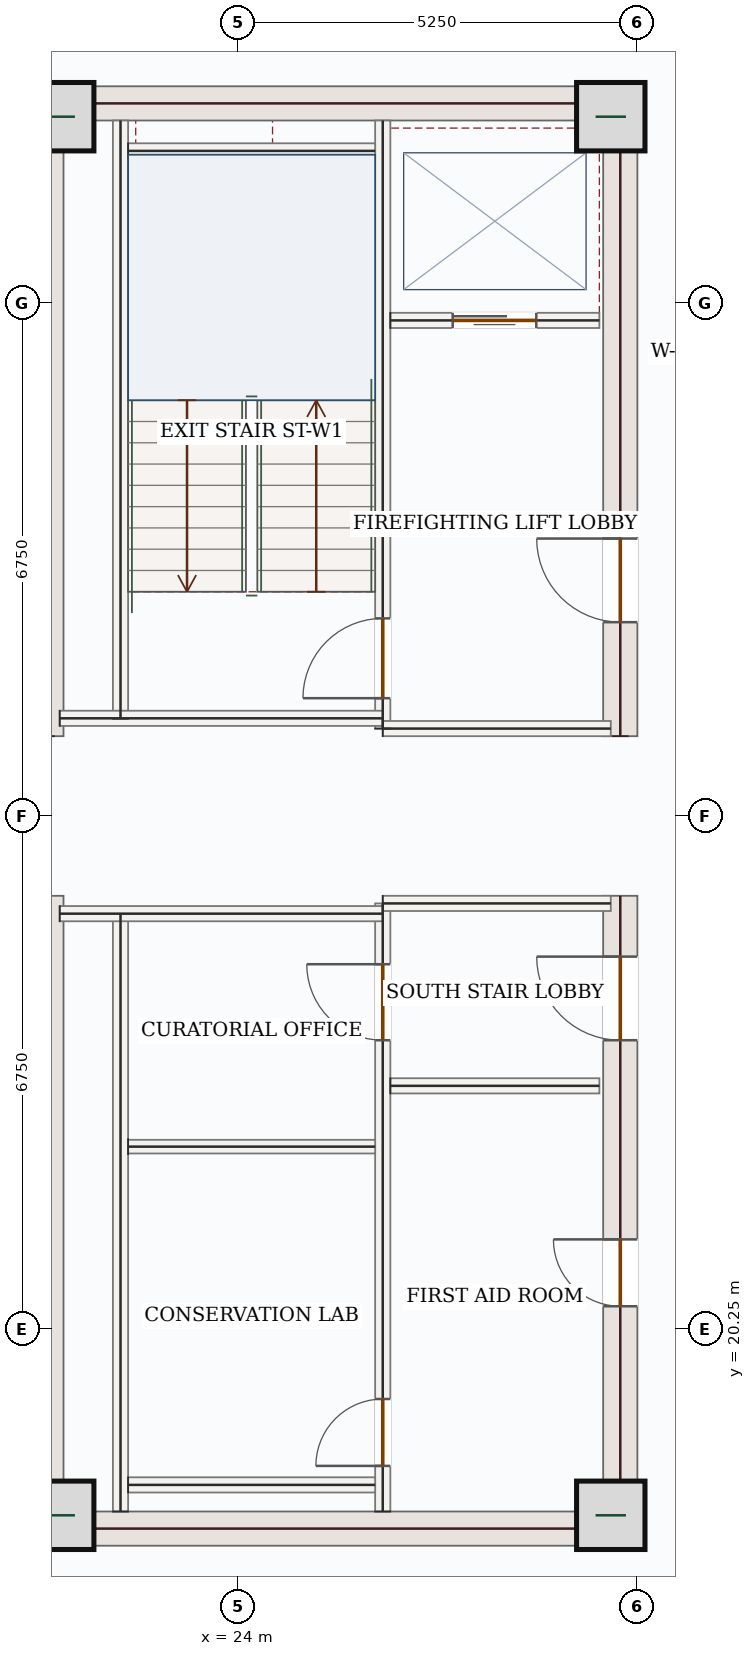
"""IFC4 building model, lengths in metres.
Left out: names, types, materials, properties, quantities, classifications, styles, units other than length and angle.
Written with IfcOpenShell. Run it as: python <this file> out.ifc"""

import sys

from ifc_helpers import new_model, si_unit, direction, frame, frame_2d, origin, origin_2d, place, context, subcontext, project, spatial, rectangle, extrude, source, transform, mapped, element, fill, save


model = new_model("IFC4")
c1 = context("Model", 3, precision=1e-05, world=origin(), true_north=direction((0.0, 1.0)))
c2 = subcontext(c1, "Body", "Model", "MODEL_VIEW")
j1 = project(units=[si_unit("LENGTHUNIT", "METRE"), si_unit("PLANEANGLEUNIT", "RADIAN")], contexts=[c1])
p1 = place(None, origin())
s1 = spatial("IfcSite", under=j1, at=p1, CompositionType="ELEMENT")
p2 = place(p1, origin())
s2 = spatial("IfcBuilding", under=s1, at=p2, CompositionType="ELEMENT")
p3 = place(p2, frame((0.0, 0.0, 353.55)))
s3 = spatial("IfcBuildingStorey", under=s2, at=p3, CompositionType="ELEMENT", Elevation=353.55)
m1 = source(origin(), c2, "Body", "SweptSolid", [
    extrude(rectangle(XDim=8.55, YDim=0.45, at=frame_2d((4.275, 0.0))), origin(), (0.0, 0.0, 1.0), 3.5),
])
for number, where, z_axis, x_axis in (
    (1, (21.475, 17.4, 0.0), (0.0, 0.0, 1.0), (0.0, 1.0, 0.0)),
    (2, (21.475, 28.05, 0.0), (0.0, 0.0, 1.0), (0.0, 1.0, 0.0)),
):
    element("IfcWall", number, at=place(p3, frame(where, z_axis=z_axis, x_axis=x_axis)), inside=s3, PredefinedType="SHEAR", context=c2, shape_type="MappedRepresentation", body=[
        mapped(m1, transform((0.0, 0.0, 0.0), x_axis=(1.0, 0.0, 0.0), y_axis=(0.0, 1.0, 0.0), z_axis=(0.0, 0.0, 1.0), scale=1.0)),
    ])
p4 = place(p3, frame((29.025, 17.4, 0.0), z_axis=(0.0, 0.0, 1.0), x_axis=(0.0, 1.0, 0.0)))
e3 = element("IfcWall", 3, at=p4, inside=s3, PredefinedType="SHEAR", context=c2, shape_type="SweptSolid", body=[
    extrude(rectangle(XDim=8.55, YDim=0.45, at=frame_2d((4.275, 0.0))), origin(), (0.0, 0.0, 1.0), 3.5),
])
p5 = place(p4, frame((6.65, 0.0, 0.0)))
e4 = element("IfcOpeningElement", 4, at=p5, cuts=e3, PredefinedType="OPENING", context=c2, shape_type="SweptSolid", body=[
    extrude(rectangle(XDim=1.1, YDim=2.2, at=frame_2d((0.55, 1.1))), frame((0.0, 0.235, 0.0), z_axis=(0.0, -1.0, 0.0), x_axis=(1.0, 0.0, 0.0)), (0.0, 0.0, 1.0), 0.47),
])
p6 = place(p4, frame((3.15, 0.0, 0.0)))
e5 = element("IfcOpeningElement", 5, at=p6, cuts=e3, PredefinedType="OPENING", context=c2, shape_type="SweptSolid", body=[
    extrude(rectangle(XDim=0.88, YDim=2.1, at=frame_2d((0.44, 1.05))), frame((0.0, 0.235, 0.0), z_axis=(0.0, -1.0, 0.0), x_axis=(1.0, 0.0, 0.0)), (0.0, 0.0, 1.0), 0.47),
])
p7 = place(p3, frame((29.025, 28.05, 0.0), z_axis=(0.0, 0.0, 1.0), x_axis=(0.0, 1.0, 0.0)))
e6 = element("IfcWall", 6, at=p7, inside=s3, PredefinedType="SHEAR", context=c2, shape_type="SweptSolid", body=[
    extrude(rectangle(XDim=8.55, YDim=0.45, at=frame_2d((4.275, 0.0))), origin(), (0.0, 0.0, 1.0), 3.5),
])
p8 = place(p7, frame((1.5, 0.0, 0.0)))
e7 = element("IfcOpeningElement", 7, at=p8, cuts=e6, PredefinedType="OPENING", context=c2, shape_type="SweptSolid", body=[
    extrude(rectangle(XDim=1.1, YDim=2.2, at=frame_2d((0.55, 1.1))), frame((0.0, 0.235, 0.0), z_axis=(0.0, -1.0, 0.0), x_axis=(1.0, 0.0, 0.0)), (0.0, 0.0, 1.0), 0.47),
])
m2 = source(origin(), c2, "Body", "SweptSolid", [
    extrude(rectangle(XDim=7.1, YDim=0.45, at=frame_2d((3.55, 0.0))), origin(), (0.0, 0.0, 1.0), 3.5),
])
for number, where, z_axis, x_axis in (
    (8, (21.7, 17.625, 0.0), (0.0, 0.0, 1.0), (1.0, 0.0, 0.0)),
    (9, (21.7, 36.375, 0.0), (0.0, 0.0, 1.0), (1.0, 0.0, 0.0)),
):
    element("IfcWall", number, at=place(p3, frame(where, z_axis=z_axis, x_axis=x_axis)), inside=s3, PredefinedType="SHEAR", context=c2, shape_type="MappedRepresentation", body=[
        mapped(m2, transform((0.0, 0.0, 0.0), x_axis=(1.0, 0.0, 0.0), y_axis=(0.0, 1.0, 0.0), z_axis=(0.0, 0.0, 1.0), scale=1.0)),
    ])
m3 = source(origin(), c2, "Body", "SweptSolid", [
    extrude(rectangle(XDim=0.9, YDim=0.9, at=origin_2d()), origin(), (0.0, 0.0, 1.0), 3.75),
])
for number, where, z_axis, x_axis in (
    (10, (21.65, 17.8, 0.0), (0.0, 0.0, 1.0), (1.0, 0.0, 0.0)),
    (11, (28.9, 17.8, 0.0), (0.0, 0.0, 1.0), (1.0, 0.0, 0.0)),
    (12, (21.65, 36.2, 0.0), (0.0, 0.0, 1.0), (1.0, 0.0, 0.0)),
    (13, (28.9, 36.2, 0.0), (0.0, 0.0, 1.0), (1.0, 0.0, 0.0)),
):
    element("IfcColumn", number, at=place(p3, frame(where, z_axis=z_axis, x_axis=x_axis)), inside=s3, PredefinedType="COLUMN", context=c2, shape_type="MappedRepresentation", body=[
        mapped(m3, transform((0.0, 0.0, 0.0), x_axis=(1.0, 0.0, 0.0), y_axis=(0.0, 1.0, 0.0), z_axis=(0.0, 0.0, 1.0), scale=1.0)),
    ])
p9 = place(p3, frame((23.005, 14.093, 0.0), z_axis=(0.0, 0.0, 1.0), x_axis=(-0.681486568047, 0.731830620821, 0.0)))
e14 = element("IfcWall", 14, at=p9, inside=s3, PredefinedType="SOLIDWALL", context=c2, shape_type="SweptSolid", body=[
    extrude(rectangle(XDim=5.965, YDim=0.28, at=frame_2d((2.982, 0.0))), origin(), (0.0, 0.0, 1.0), 3.5),
])
p10 = place(p9, frame((2.232, 0.0, 0.85)))
e15 = element("IfcOpeningElement", 15, at=p10, cuts=e14, PredefinedType="OPENING", context=c2, shape_type="SweptSolid", body=[
    extrude(rectangle(XDim=1.5, YDim=1.5, at=frame_2d((0.75, 0.75))), frame((0.0, 0.15, 0.0), z_axis=(0.0, -1.0, 0.0), x_axis=(1.0, 0.0, 0.0)), (0.0, 0.0, 1.0), 0.3),
])
m4 = source(origin(), c2, "Body", "SweptSolid", [
    extrude(rectangle(XDim=7.87, YDim=0.2, at=frame_2d((3.935, 0.0))), origin(), (0.0, 0.0, 1.0), 3.5),
])
for number, where, z_axis, x_axis in (
    (16, (22.45, 17.85, 0.0), (0.0, 0.0, 1.0), (0.0, 1.0, 0.0)),
    (17, (22.45, 28.28, 0.0), (0.0, 0.0, 1.0), (0.0, 1.0, 0.0)),
):
    element("IfcWall", number, at=place(p3, frame(where, z_axis=z_axis, x_axis=x_axis)), inside=s3, PredefinedType="SOLIDWALL", context=c2, shape_type="MappedRepresentation", body=[
        mapped(m4, transform((0.0, 0.0, 0.0), x_axis=(1.0, 0.0, 0.0), y_axis=(0.0, 1.0, 0.0), z_axis=(0.0, 0.0, 1.0), scale=1.0)),
    ])
p11 = place(p3, frame((25.9, 17.85, 0.0), z_axis=(0.0, 0.0, 1.0), x_axis=(0.0, 1.0, 0.0)))
e18 = element("IfcWall", 18, at=p11, inside=s3, PredefinedType="SOLIDWALL", context=c2, shape_type="SweptSolid", body=[
    extrude(rectangle(XDim=8.0, YDim=0.2, at=frame_2d((4.0, 0.0))), origin(), (0.0, 0.0, 1.0), 3.5),
])
p12 = place(p11, frame((6.2, 0.0, 0.0)))
e19 = element("IfcOpeningElement", 19, at=p12, cuts=e18, PredefinedType="OPENING", context=c2, shape_type="SweptSolid", body=[
    extrude(rectangle(XDim=1.0, YDim=2.15, at=frame_2d((0.5, 1.075))), frame((0.0, 0.11, 0.0), z_axis=(0.0, -1.0, 0.0), x_axis=(1.0, 0.0, 0.0)), (0.0, 0.0, 1.0), 0.22),
])
p13 = place(p11, frame((0.6, 0.0, 0.0)))
e20 = element("IfcOpeningElement", 20, at=p13, cuts=e18, PredefinedType="OPENING", context=c2, shape_type="SweptSolid", body=[
    extrude(rectangle(XDim=0.88, YDim=2.1, at=frame_2d((0.44, 1.05))), frame((0.0, 0.11, 0.0), z_axis=(0.0, -1.0, 0.0), x_axis=(1.0, 0.0, 0.0)), (0.0, 0.0, 1.0), 0.22),
])
p14 = place(p3, frame((25.9, 28.15, 0.0), z_axis=(0.0, 0.0, 1.0), x_axis=(0.0, 1.0, 0.0)))
e21 = element("IfcWall", 21, at=p14, inside=s3, PredefinedType="SOLIDWALL", context=c2, shape_type="SweptSolid", body=[
    extrude(rectangle(XDim=8.0, YDim=0.2, at=frame_2d((4.0, 0.0))), origin(), (0.0, 0.0, 1.0), 3.5),
])
p15 = place(p14, frame((0.4, 0.0, 0.0)))
e22 = element("IfcOpeningElement", 22, at=p15, cuts=e21, PredefinedType="OPENING", context=c2, shape_type="SweptSolid", body=[
    extrude(rectangle(XDim=1.05, YDim=2.15, at=frame_2d((0.525, 1.075))), frame((0.0, 0.11, 0.0), z_axis=(0.0, -1.0, 0.0), x_axis=(1.0, 0.0, 0.0)), (0.0, 0.0, 1.0), 0.22),
])
m5 = source(origin(), c2, "Body", "SweptSolid", [
    extrude(rectangle(XDim=4.25, YDim=0.2, at=frame_2d((2.125, 0.0))), origin(), (0.0, 0.0, 1.0), 3.5),
])
p16 = place(p3, frame((21.65, 25.715, 0.0), z_axis=(0.0, 0.0, 1.0), x_axis=(1.0, 0.0, 0.0)))
e23 = element("IfcWall", 23, at=p16, inside=s3, PredefinedType="SOLIDWALL", context=c2, shape_type="MappedRepresentation", body=[
    mapped(m5, transform((0.0, 0.0, 0.0), x_axis=(1.0, 0.0, 0.0), y_axis=(0.0, 1.0, 0.0), z_axis=(0.0, 0.0, 1.0), scale=1.0)),
])
m6 = source(origin(), c2, "Body", "SweptSolid", [
    extrude(rectangle(XDim=3.0, YDim=0.2, at=frame_2d((1.5, 0.0))), origin(), (0.0, 0.0, 1.0), 3.5),
])
p17 = place(p3, frame((25.9, 25.85, 0.0), z_axis=(0.0, 0.0, 1.0), x_axis=(1.0, 0.0, 0.0)))
e24 = element("IfcWall", 24, at=p17, inside=s3, PredefinedType="SOLIDWALL", context=c2, shape_type="MappedRepresentation", body=[
    mapped(m6, transform((0.0, 0.0, 0.0), x_axis=(1.0, 0.0, 0.0), y_axis=(0.0, 1.0, 0.0), z_axis=(0.0, 0.0, 1.0), scale=1.0)),
])
p18 = place(p3, frame((21.65, 28.285, 0.0), z_axis=(0.0, 0.0, 1.0), x_axis=(1.0, 0.0, 0.0)))
e25 = element("IfcWall", 25, at=p18, inside=s3, PredefinedType="SOLIDWALL", context=c2, shape_type="MappedRepresentation", body=[
    mapped(m5, transform((0.0, 0.0, 0.0), x_axis=(1.0, 0.0, 0.0), y_axis=(0.0, 1.0, 0.0), z_axis=(0.0, 0.0, 1.0), scale=1.0)),
])
p19 = place(p3, frame((25.9, 28.15, 0.0), z_axis=(0.0, 0.0, 1.0), x_axis=(1.0, 0.0, 0.0)))
e26 = element("IfcWall", 26, at=p19, inside=s3, PredefinedType="SOLIDWALL", context=c2, shape_type="MappedRepresentation", body=[
    mapped(m6, transform((0.0, 0.0, 0.0), x_axis=(1.0, 0.0, 0.0), y_axis=(0.0, 1.0, 0.0), z_axis=(0.0, 0.0, 1.0), scale=1.0)),
])
m7 = source(origin(), c2, "Body", "SweptSolid", [
    extrude(rectangle(XDim=3.25, YDim=0.2, at=frame_2d((1.625, 0.0))), origin(), (0.0, 0.0, 1.0), 3.5),
])
for number, where, z_axis, x_axis in (
    (27, (22.55, 35.75, 0.0), (0.0, 0.0, 1.0), (1.0, 0.0, 0.0)),
    (28, (22.55, 18.2, 0.0), (0.0, 0.0, 1.0), (1.0, 0.0, 0.0)),
):
    element("IfcWall", number, at=place(p3, frame(where, z_axis=z_axis, x_axis=x_axis)), inside=s3, PredefinedType="SOLIDWALL", context=c2, shape_type="MappedRepresentation", body=[
        mapped(m7, transform((0.0, 0.0, 0.0), x_axis=(1.0, 0.0, 0.0), y_axis=(0.0, 1.0, 0.0), z_axis=(0.0, 0.0, 1.0), scale=1.0)),
    ])
m8 = source(origin(), c2, "Body", "SweptSolid", [
    extrude(rectangle(XDim=3.25, YDim=0.18, at=frame_2d((1.625, 0.0))), origin(), (0.0, 0.0, 1.0), 3.5),
])
p20 = place(p3, frame((22.55, 22.65, 0.0), z_axis=(0.0, 0.0, 1.0), x_axis=(1.0, 0.0, 0.0)))
e29 = element("IfcWall", 29, at=p20, inside=s3, PredefinedType="PARTITIONING", context=c2, shape_type="MappedRepresentation", body=[
    mapped(m8, transform((0.0, 0.0, 0.0), x_axis=(1.0, 0.0, 0.0), y_axis=(0.0, 1.0, 0.0), z_axis=(0.0, 0.0, 1.0), scale=1.0)),
])
p21 = place(p3, frame((26.0, 33.52, 0.0), z_axis=(0.0, 0.0, 1.0), x_axis=(1.0, 0.0, 0.0)))
e30 = element("IfcWall", 30, at=p21, inside=s3, PredefinedType="SOLIDWALL", context=c2, shape_type="SweptSolid", body=[
    extrude(rectangle(XDim=2.75, YDim=0.2, at=frame_2d((1.375, 0.0))), origin(), (0.0, 0.0, 1.0), 3.5),
])
p22 = place(p21, frame((0.82, 0.0, 0.0)))
e31 = element("IfcOpeningElement", 31, at=p22, cuts=e30, PredefinedType="OPENING", context=c2, shape_type="SweptSolid", body=[
    extrude(rectangle(XDim=1.1, YDim=2.15, at=frame_2d((0.55, 1.075))), frame((0.0, 0.11, 0.0), z_axis=(0.0, -1.0, 0.0), x_axis=(1.0, 0.0, 0.0)), (0.0, 0.0, 1.0), 0.22),
])
m9 = source(origin(), c2, "Body", "SweptSolid", [
    extrude(rectangle(XDim=2.75, YDim=0.2, at=frame_2d((1.375, 0.0))), origin(), (0.0, 0.0, 1.0), 3.5),
])
p23 = place(p3, frame((26.0, 23.45, 0.0), z_axis=(0.0, 0.0, 1.0), x_axis=(1.0, 0.0, 0.0)))
e32 = element("IfcWall", 32, at=p23, inside=s3, PredefinedType="SOLIDWALL", context=c2, shape_type="MappedRepresentation", body=[
    mapped(m9, transform((0.0, 0.0, 0.0), x_axis=(1.0, 0.0, 0.0), y_axis=(0.0, 1.0, 0.0), z_axis=(0.0, 0.0, 1.0), scale=1.0)),
])
m10 = source(origin(), c2, "Body", "SweptSolid", [
    extrude(rectangle(XDim=1.05, YDim=2.15, at=frame_2d((0.525, 1.075))), frame((0.0, 0.025, 0.0), z_axis=(0.0, -1.0, 0.0), x_axis=(1.0, 0.0, 0.0)), (0.0, 0.0, 1.0), 0.05),
])
p24 = place(p15, origin())
e33 = element("IfcDoor", 33, at=p24, inside=s3, OperationType="SINGLE_SWING_LEFT", PredefinedType="DOOR", context=c2, shape_type="MappedRepresentation", body=[
    mapped(m10, transform((0.0, 0.0, 0.0), x_axis=(1.0, 0.0, 0.0), y_axis=(0.0, 1.0, 0.0), z_axis=(0.0, 0.0, 1.0), scale=1.0)),
])
fill(e22, e33)
m11 = source(origin(), c2, "Body", "SweptSolid", [
    extrude(rectangle(XDim=1.0, YDim=2.15, at=frame_2d((0.5, 1.075))), frame((0.0, 0.025, 0.0), z_axis=(0.0, -1.0, 0.0), x_axis=(1.0, 0.0, 0.0)), (0.0, 0.0, 1.0), 0.05),
])
p25 = place(p12, origin())
e34 = element("IfcDoor", 34, at=p25, inside=s3, OperationType="SINGLE_SWING_RIGHT", PredefinedType="DOOR", context=c2, shape_type="MappedRepresentation", body=[
    mapped(m11, transform((0.0, 0.0, 0.0), x_axis=(1.0, 0.0, 0.0), y_axis=(0.0, 1.0, 0.0), z_axis=(0.0, 0.0, 1.0), scale=1.0)),
])
fill(e19, e34)
m12 = source(origin(), c2, "Body", "SweptSolid", [
    extrude(rectangle(XDim=0.88, YDim=2.1, at=frame_2d((0.44, 1.05))), frame((0.0, 0.025, 0.0), z_axis=(0.0, -1.0, 0.0), x_axis=(1.0, 0.0, 0.0)), (0.0, 0.0, 1.0), 0.05),
])
p26 = place(p13, origin())
e35 = element("IfcDoor", 35, at=p26, inside=s3, OperationType="SINGLE_SWING_LEFT", PredefinedType="DOOR", context=c2, shape_type="MappedRepresentation", body=[
    mapped(m12, transform((0.0, 0.0, 0.0), x_axis=(1.0, 0.0, 0.0), y_axis=(0.0, 1.0, 0.0), z_axis=(0.0, 0.0, 1.0), scale=1.0)),
])
fill(e20, e35)
m13 = source(origin(), c2, "Body", "SweptSolid", [
    extrude(rectangle(XDim=1.1, YDim=2.15, at=frame_2d((0.55, 1.075))), frame((0.0, 0.025, 0.0), z_axis=(0.0, -1.0, 0.0), x_axis=(1.0, 0.0, 0.0)), (0.0, 0.0, 1.0), 0.05),
])
p27 = place(p22, origin())
e36 = element("IfcDoor", 36, at=p27, inside=s3, OperationType="DOUBLE_DOOR_SLIDING", PredefinedType="DOOR", context=c2, shape_type="MappedRepresentation", body=[
    mapped(m13, transform((0.0, 0.0, 0.0), x_axis=(1.0, 0.0, 0.0), y_axis=(0.0, 1.0, 0.0), z_axis=(0.0, 0.0, 1.0), scale=1.0)),
])
fill(e31, e36)
m14 = source(origin(), c2, "Body", "SweptSolid", [
    extrude(rectangle(XDim=1.1, YDim=2.2, at=frame_2d((0.55, 1.1))), frame((0.0, 0.025, 0.0), z_axis=(0.0, -1.0, 0.0), x_axis=(1.0, 0.0, 0.0)), (0.0, 0.0, 1.0), 0.05),
])
p28 = place(p8, origin())
e37 = element("IfcDoor", 37, at=p28, inside=s3, OperationType="SINGLE_SWING_RIGHT", PredefinedType="DOOR", context=c2, shape_type="MappedRepresentation", body=[
    mapped(m14, transform((0.0, 0.0, 0.0), x_axis=(1.0, 0.0, 0.0), y_axis=(0.0, 1.0, 0.0), z_axis=(0.0, 0.0, 1.0), scale=1.0)),
])
fill(e7, e37)
p29 = place(p5, origin())
e38 = element("IfcDoor", 38, at=p29, inside=s3, OperationType="SINGLE_SWING_RIGHT", PredefinedType="DOOR", context=c2, shape_type="MappedRepresentation", body=[
    mapped(m14, transform((0.0, 0.0, 0.0), x_axis=(1.0, 0.0, 0.0), y_axis=(0.0, 1.0, 0.0), z_axis=(0.0, 0.0, 1.0), scale=1.0)),
])
fill(e4, e38)
p30 = place(p6, origin())
e39 = element("IfcDoor", 39, at=p30, inside=s3, OperationType="SINGLE_SWING_RIGHT", PredefinedType="DOOR", context=c2, shape_type="MappedRepresentation", body=[
    mapped(m12, transform((0.0, 0.0, 0.0), x_axis=(1.0, 0.0, 0.0), y_axis=(0.0, 1.0, 0.0), z_axis=(0.0, 0.0, 1.0), scale=1.0)),
])
fill(e5, e39)
save(model, sys.argv[1])
